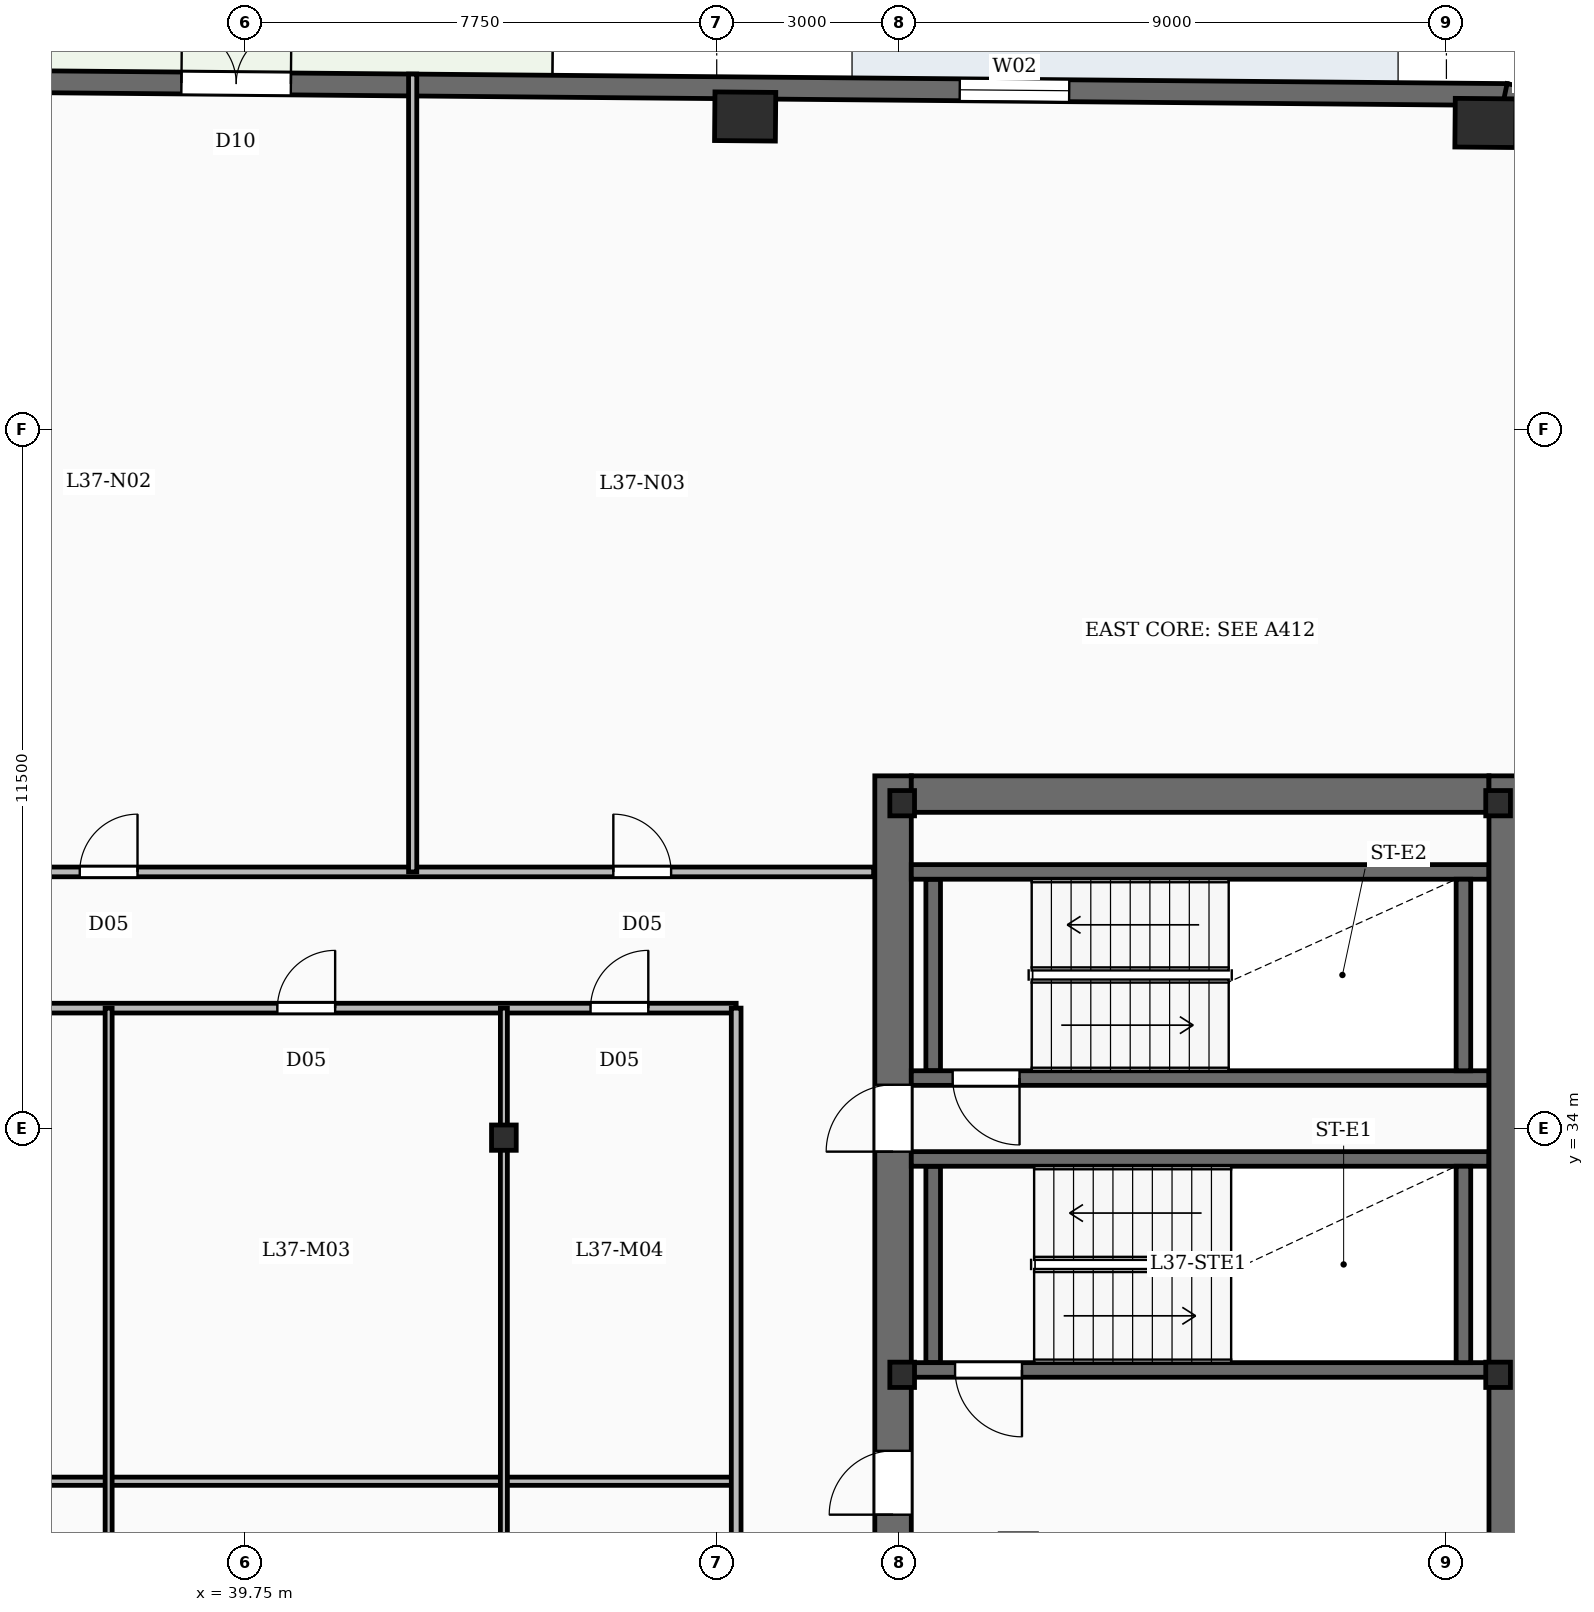
"""IFC4 building model, lengths in metres.
Left out: names, types, materials, properties, quantities, classifications, styles, units other than length and angle.
Written with IfcOpenShell. Run it as: python <this file> out.ifc"""

import sys

from ifc_helpers import new_model, si_unit, direction, frame, frame_2d, origin, origin_2d, place, context, subcontext, project, spatial, rectangle, i_section, extrude, element, fill, save


model = new_model("IFC4")
c1 = context("Model", 3, precision=1e-05, world=origin(), true_north=direction((0.0, 1.0)))
c2 = subcontext(c1, "Body", "Model", "MODEL_VIEW")
j1 = project(units=[si_unit("LENGTHUNIT", "METRE"), si_unit("PLANEANGLEUNIT", "RADIAN")], contexts=[c1])
p1 = place(None, origin())
s1 = spatial("IfcSite", under=j1, at=p1, CompositionType="ELEMENT")
p2 = place(p1, origin())
s2 = spatial("IfcBuilding", under=s1, at=p2, CompositionType="ELEMENT")
p3 = place(p2, frame((0.0, 0.0, 158.45)))
s3 = spatial("IfcBuildingStorey", under=s2, at=p3, CompositionType="ELEMENT", Elevation=158.45)
p4 = place(p3, frame((50.4, 19.0, -0.45), z_axis=(0.0, 0.0, 1.0), x_axis=(0.0, 1.0, 0.0)))
e1 = element("IfcWall", 1, at=p4, inside=s3, PredefinedType="SHEAR", context=c2, shape_type="SweptSolid", body=[
    extrude(rectangle(XDim=20.8, YDim=0.6, at=frame_2d((10.4, 0.0))), origin(), (0.0, 0.0, 1.0), 3.93),
])
p5 = place(p4, frame((2.5, 0.0, 0.45)))
e2 = element("IfcOpeningElement", 2, at=p5, cuts=e1, PredefinedType="OPENING", context=c2, shape_type="SweptSolid", body=[
    extrude(rectangle(XDim=1.05, YDim=2.15, at=frame_2d((0.525, 1.075))), frame((0.0, 0.31, 0.0), z_axis=(0.0, -1.0, 0.0), x_axis=(1.0, 0.0, 0.0)), (0.0, 0.0, 1.0), 0.62),
])
p6 = place(p4, frame((8.65, 0.0, 0.45)))
e3 = element("IfcOpeningElement", 3, at=p6, cuts=e1, PredefinedType="OPENING", context=c2, shape_type="SweptSolid", body=[
    extrude(rectangle(XDim=1.05, YDim=2.15, at=frame_2d((0.525, 1.075))), frame((0.0, 0.31, 0.0), z_axis=(0.0, -1.0, 0.0), x_axis=(1.0, 0.0, 0.0)), (0.0, 0.0, 1.0), 0.62),
])
p7 = place(p4, frame((14.62, 0.0, 0.45)))
e4 = element("IfcOpeningElement", 4, at=p7, cuts=e1, PredefinedType="OPENING", context=c2, shape_type="SweptSolid", body=[
    extrude(rectangle(XDim=1.1, YDim=2.15, at=frame_2d((0.55, 1.075))), frame((0.0, 0.31, 0.0), z_axis=(0.0, -1.0, 0.0), x_axis=(1.0, 0.0, 0.0)), (0.0, 0.0, 1.0), 0.62),
])
p8 = place(p3, frame((60.5, 19.0, -0.45), z_axis=(0.0, 0.0, 1.0), x_axis=(0.0, 1.0, 0.0)))
e5 = element("IfcWall", 5, at=p8, inside=s3, PredefinedType="SHEAR", context=c2, shape_type="SweptSolid", body=[
    extrude(rectangle(XDim=20.8, YDim=0.6, at=frame_2d((10.4, 0.0))), origin(), (0.0, 0.0, 1.0), 3.93),
])
p9 = place(p3, frame((50.7, 39.5, -0.45), z_axis=(0.0, 0.0, 1.0), x_axis=(1.0, 0.0, 0.0)))
e6 = element("IfcWall", 6, at=p9, inside=s3, PredefinedType="SHEAR", context=c2, shape_type="SweptSolid", body=[
    extrude(rectangle(XDim=9.5, YDim=0.6, at=frame_2d((4.75, 0.0))), origin(), (0.0, 0.0, 1.0), 3.93),
])
for number, where, z_axis, x_axis in (
    (7, (50.55, 29.95, -0.45), (0.0, 0.0, 1.0), (1.0, 0.0, 0.0)),
    (8, (60.35, 29.95, -0.45), (0.0, 0.0, 1.0), (1.0, 0.0, 0.0)),
    (9, (50.55, 39.35, -0.45), (0.0, 0.0, 1.0), (1.0, 0.0, 0.0)),
    (10, (60.35, 39.35, -0.45), (0.0, 0.0, 1.0), (1.0, 0.0, 0.0)),
    (11, (44.0, 33.85, -0.45), (0.0, 0.0, 1.0), (1.0, 0.0, 0.0)),
):
    element("IfcColumn", number, at=place(p3, frame(where, z_axis=z_axis, x_axis=x_axis)), inside=s3, PredefinedType="COLUMN", context=c2, shape_type="SweptSolid", body=[
        extrude(i_section(OverallWidth=0.406, OverallDepth=0.416, WebThickness=0.03, FlangeThickness=0.048, FilletRadius=0.02, at=origin_2d()), origin(), (0.0, 0.0, 1.0), 3.93),
    ])
for number, where, z_axis, x_axis in (
    (12, (60.142, 50.537, -0.45), (0.0, 0.0, 1.0), (1.0, -0.009, 0.0)),
    (13, (47.968, 50.643, -0.45), (0.0, 0.0, 1.0), (1.0, -0.009, 0.0)),
):
    element("IfcColumn", number, at=place(p3, frame(where, z_axis=z_axis, x_axis=x_axis)), inside=s3, PredefinedType="COLUMN", context=c2, shape_type="SweptSolid", body=[
        extrude(rectangle(XDim=1.0, YDim=0.8, at=origin_2d()), origin(), (0.0, 0.0, 1.0), 3.93),
    ])
p10 = place(p3, frame((60.461, 51.007, 0.0), z_axis=(0.0, 0.0, 1.0), x_axis=(0.979059388908, -0.203574833883, 0.0)))
e14 = element("IfcWall", 14, at=p10, inside=s3, PredefinedType="SOLIDWALL", context=c2, shape_type="SweptSolid", body=[
    extrude(rectangle(XDim=2.107, YDim=0.36, at=frame_2d((1.054, 0.0))), origin(), (0.0, 0.0, 1.0), 3.48),
])
p11 = place(p3, frame((11.098, 51.435, 0.0), z_axis=(0.0, 0.0, 1.0), x_axis=(0.99996191194, -0.008727810138, 0.0)))
e15 = element("IfcWall", 15, at=p11, inside=s3, PredefinedType="SOLIDWALL", context=c2, shape_type="SweptSolid", body=[
    extrude(rectangle(XDim=49.4, YDim=0.36, at=frame_2d((24.7, 0.0))), origin(), (0.0, 0.0, 1.0), 3.48),
])
p12 = place(p11, frame((27.6, 0.0, 0.0)))
e16 = element("IfcOpeningElement", 16, at=p12, cuts=e15, PredefinedType="OPENING", context=c2, shape_type="SweptSolid", body=[
    extrude(rectangle(XDim=1.8, YDim=2.25, at=frame_2d((0.9, 1.125))), frame((0.0, 0.19, 0.0), z_axis=(0.0, -1.0, 0.0), x_axis=(1.0, 0.0, 0.0)), (0.0, 0.0, 1.0), 0.38),
])
p13 = place(p11, frame((8.0, 0.0, 0.88)))
e17 = element("IfcOpeningElement", 17, at=p13, cuts=e15, PredefinedType="OPENING", context=c2, shape_type="SweptSolid", body=[
    extrude(rectangle(XDim=1.8, YDim=2.15, at=frame_2d((0.9, 1.075))), frame((0.0, 0.19, 0.0), z_axis=(0.0, -1.0, 0.0), x_axis=(1.0, 0.0, 0.0)), (0.0, 0.0, 1.0), 0.38),
])
p14 = place(p11, frame((18.8, 0.0, 0.88)))
e18 = element("IfcOpeningElement", 18, at=p14, cuts=e15, PredefinedType="OPENING", context=c2, shape_type="SweptSolid", body=[
    extrude(rectangle(XDim=1.8, YDim=2.15, at=frame_2d((0.9, 1.075))), frame((0.0, 0.19, 0.0), z_axis=(0.0, -1.0, 0.0), x_axis=(1.0, 0.0, 0.0)), (0.0, 0.0, 1.0), 0.38),
])
p15 = place(p11, frame((40.4, 0.0, 0.88)))
e19 = element("IfcOpeningElement", 19, at=p15, cuts=e15, PredefinedType="OPENING", context=c2, shape_type="SweptSolid", body=[
    extrude(rectangle(XDim=1.8, YDim=2.15, at=frame_2d((0.9, 1.075))), frame((0.0, 0.19, 0.0), z_axis=(0.0, -1.0, 0.0), x_axis=(1.0, 0.0, 0.0)), (0.0, 0.0, 1.0), 0.38),
])
p16 = place(p3, frame((60.2, 30.03, 0.0), z_axis=(0.0, 0.0, 1.0), x_axis=(-1.0, 0.0, 0.0)))
e20 = element("IfcWall", 20, at=p16, inside=s3, PredefinedType="SOLIDWALL", context=c2, shape_type="SweptSolid", body=[
    extrude(rectangle(XDim=9.5, YDim=0.24, at=frame_2d((4.75, 0.0))), origin(), (0.0, 0.0, 1.0), 3.48),
])
p17 = place(p16, frame((7.68, 0.0, 0.0)))
e21 = element("IfcOpeningElement", 21, at=p17, cuts=e20, PredefinedType="OPENING", context=c2, shape_type="SweptSolid", body=[
    extrude(rectangle(XDim=1.1, YDim=2.15, at=frame_2d((0.55, 1.075))), frame((0.0, 0.13, 0.0), z_axis=(0.0, -1.0, 0.0), x_axis=(1.0, 0.0, 0.0)), (0.0, 0.0, 1.0), 0.26),
])
p18 = place(p3, frame((50.7, 33.5, 0.0), z_axis=(0.0, 0.0, 1.0), x_axis=(1.0, 0.0, 0.0)))
e22 = element("IfcWall", 22, at=p18, inside=s3, PredefinedType="SOLIDWALL", context=c2, shape_type="SweptSolid", body=[
    extrude(rectangle(XDim=9.5, YDim=0.24, at=frame_2d((4.75, 0.0))), origin(), (0.0, 0.0, 1.0), 3.48),
])
for number, where, z_axis, x_axis in (
    (23, (51.06, 30.15, 0.0), (0.0, 0.0, 1.0), (0.0, 1.0, 0.0)),
    (24, (59.78, 30.15, 0.0), (0.0, 0.0, 1.0), (0.0, 1.0, 0.0)),
):
    element("IfcWall", number, at=place(p3, frame(where, z_axis=z_axis, x_axis=x_axis)), inside=s3, PredefinedType="SOLIDWALL", context=c2, shape_type="SweptSolid", body=[
        extrude(rectangle(XDim=3.23, YDim=0.24, at=frame_2d((1.615, 0.0))), origin(), (0.0, 0.0, 1.0), 3.48),
    ])
p19 = place(p3, frame((60.2, 34.83, 0.0), z_axis=(0.0, 0.0, 1.0), x_axis=(-1.0, 0.0, 0.0)))
e25 = element("IfcWall", 25, at=p19, inside=s3, PredefinedType="SOLIDWALL", context=c2, shape_type="SweptSolid", body=[
    extrude(rectangle(XDim=9.5, YDim=0.24, at=frame_2d((4.75, 0.0))), origin(), (0.0, 0.0, 1.0), 3.48),
])
p20 = place(p19, frame((7.72, 0.0, 0.0)))
e26 = element("IfcOpeningElement", 26, at=p20, cuts=e25, PredefinedType="OPENING", context=c2, shape_type="SweptSolid", body=[
    extrude(rectangle(XDim=1.1, YDim=2.15, at=frame_2d((0.55, 1.075))), frame((0.0, 0.13, 0.0), z_axis=(0.0, -1.0, 0.0), x_axis=(1.0, 0.0, 0.0)), (0.0, 0.0, 1.0), 0.26),
])
p21 = place(p3, frame((50.7, 38.22, 0.0), z_axis=(0.0, 0.0, 1.0), x_axis=(1.0, 0.0, 0.0)))
e27 = element("IfcWall", 27, at=p21, inside=s3, PredefinedType="SOLIDWALL", context=c2, shape_type="SweptSolid", body=[
    extrude(rectangle(XDim=9.5, YDim=0.24, at=frame_2d((4.75, 0.0))), origin(), (0.0, 0.0, 1.0), 3.48),
])
for number, where, z_axis, x_axis in (
    (28, (51.06, 34.95, 0.0), (0.0, 0.0, 1.0), (0.0, 1.0, 0.0)),
    (29, (59.78, 34.95, 0.0), (0.0, 0.0, 1.0), (0.0, 1.0, 0.0)),
):
    element("IfcWall", number, at=place(p3, frame(where, z_axis=z_axis, x_axis=x_axis)), inside=s3, PredefinedType="SOLIDWALL", context=c2, shape_type="SweptSolid", body=[
        extrude(rectangle(XDim=3.15, YDim=0.24, at=frame_2d((1.575, 0.0))), origin(), (0.0, 0.0, 1.0), 3.48),
    ])
p22 = place(p3, frame((42.5, 38.22, 0.0), z_axis=(0.0, 0.0, 1.0), x_axis=(0.0, 1.0, 0.0)))
e30 = element("IfcWall", 30, at=p22, inside=s3, PredefinedType="PARTITIONING", context=c2, shape_type="SweptSolid", body=[
    extrude(rectangle(XDim=13.121, YDim=0.135, at=frame_2d((6.561, 0.0))), origin(), (0.0, 0.0, 1.0), 2.54),
])
p23 = place(p3, frame((24.82, 38.22, 0.0), z_axis=(0.0, 0.0, 1.0), x_axis=(1.0, 0.0, 0.0)))
e31 = element("IfcWall", 31, at=p23, inside=s3, PredefinedType="PARTITIONING", context=c2, shape_type="SweptSolid", body=[
    extrude(rectangle(XDim=25.26, YDim=0.16, at=frame_2d((12.63, 0.0))), origin(), (0.0, 0.0, 1.0), 2.54),
])
p24 = place(p23, frame((3.38, 0.0, 0.0)))
e32 = element("IfcOpeningElement", 32, at=p24, cuts=e31, PredefinedType="OPENING", context=c2, shape_type="SweptSolid", body=[
    extrude(rectangle(XDim=0.95, YDim=2.15, at=frame_2d((0.475, 1.075))), frame((0.0, 0.09, 0.0), z_axis=(0.0, -1.0, 0.0), x_axis=(1.0, 0.0, 0.0)), (0.0, 0.0, 1.0), 0.18),
])
p25 = place(p23, frame((12.205, 0.0, 0.0)))
e33 = element("IfcOpeningElement", 33, at=p25, cuts=e31, PredefinedType="OPENING", context=c2, shape_type="SweptSolid", body=[
    extrude(rectangle(XDim=0.95, YDim=2.15, at=frame_2d((0.475, 1.075))), frame((0.0, 0.09, 0.0), z_axis=(0.0, -1.0, 0.0), x_axis=(1.0, 0.0, 0.0)), (0.0, 0.0, 1.0), 0.18),
])
p26 = place(p23, frame((20.98, 0.0, 0.0)))
e34 = element("IfcOpeningElement", 34, at=p26, cuts=e31, PredefinedType="OPENING", context=c2, shape_type="SweptSolid", body=[
    extrude(rectangle(XDim=0.95, YDim=2.15, at=frame_2d((0.475, 1.075))), frame((0.0, 0.09, 0.0), z_axis=(0.0, -1.0, 0.0), x_axis=(1.0, 0.0, 0.0)), (0.0, 0.0, 1.0), 0.18),
])
for number, where, z_axis, x_axis in (
    (35, (37.5, 15.38, 0.0), (0.0, 0.0, 1.0), (0.0, 1.0, 0.0)),
    (36, (44.0, 15.38, 0.0), (0.0, 0.0, 1.0), (0.0, 1.0, 0.0)),
):
    element("IfcWall", number, at=place(p3, frame(where, z_axis=z_axis, x_axis=x_axis)), inside=s3, PredefinedType="PARTITIONING", context=c2, shape_type="SweptSolid", body=[
        extrude(rectangle(XDim=20.6, YDim=0.115, at=frame_2d((10.3, 0.0))), origin(), (0.0, 0.0, 1.0), 2.54),
    ])
p27 = place(p3, frame((27.08, 28.2, 0.0), z_axis=(0.0, 0.0, 1.0), x_axis=(1.0, 0.0, 0.0)))
e37 = element("IfcWall", 37, at=p27, inside=s3, PredefinedType="PARTITIONING", context=c2, shape_type="SweptSolid", body=[
    extrude(rectangle(XDim=20.74, YDim=0.135, at=frame_2d((10.37, 0.0))), origin(), (0.0, 0.0, 1.0), 2.54),
])
p28 = place(p3, frame((27.08, 35.98, 0.0), z_axis=(0.0, 0.0, 1.0), x_axis=(1.0, 0.0, 0.0)))
e38 = element("IfcWall", 38, at=p28, inside=s3, PredefinedType="PARTITIONING", context=c2, shape_type="SweptSolid", body=[
    extrude(rectangle(XDim=20.74, YDim=0.16, at=frame_2d((10.37, 0.0))), origin(), (0.0, 0.0, 1.0), 2.54),
])
p29 = place(p28, frame((1.245, 0.0, 0.0)))
e39 = element("IfcOpeningElement", 39, at=p29, cuts=e38, PredefinedType="OPENING", context=c2, shape_type="SweptSolid", body=[
    extrude(rectangle(XDim=0.95, YDim=2.15, at=frame_2d((0.475, 1.075))), frame((0.0, 0.09, 0.0), z_axis=(0.0, -1.0, 0.0), x_axis=(1.0, 0.0, 0.0)), (0.0, 0.0, 1.0), 0.18),
])
p30 = place(p28, frame((6.445, 0.0, 0.0)))
e40 = element("IfcOpeningElement", 40, at=p30, cuts=e38, PredefinedType="OPENING", context=c2, shape_type="SweptSolid", body=[
    extrude(rectangle(XDim=0.95, YDim=2.15, at=frame_2d((0.475, 1.075))), frame((0.0, 0.09, 0.0), z_axis=(0.0, -1.0, 0.0), x_axis=(1.0, 0.0, 0.0)), (0.0, 0.0, 1.0), 0.18),
])
p31 = place(p28, frame((13.195, 0.0, 0.0)))
e41 = element("IfcOpeningElement", 41, at=p31, cuts=e38, PredefinedType="OPENING", context=c2, shape_type="SweptSolid", body=[
    extrude(rectangle(XDim=0.95, YDim=2.15, at=frame_2d((0.475, 1.075))), frame((0.0, 0.09, 0.0), z_axis=(0.0, -1.0, 0.0), x_axis=(1.0, 0.0, 0.0)), (0.0, 0.0, 1.0), 0.18),
])
p32 = place(p28, frame((18.345, 0.0, 0.0)))
e42 = element("IfcOpeningElement", 42, at=p32, cuts=e38, PredefinedType="OPENING", context=c2, shape_type="SweptSolid", body=[
    extrude(rectangle(XDim=0.95, YDim=2.15, at=frame_2d((0.475, 1.075))), frame((0.0, 0.09, 0.0), z_axis=(0.0, -1.0, 0.0), x_axis=(1.0, 0.0, 0.0)), (0.0, 0.0, 1.0), 0.18),
])
p33 = place(p3, frame((47.82, 15.38, 0.0), z_axis=(0.0, 0.0, 1.0), x_axis=(0.0, 1.0, 0.0)))
e43 = element("IfcWall", 43, at=p33, inside=s3, PredefinedType="PARTITIONING", context=c2, shape_type="SweptSolid", body=[
    extrude(rectangle(XDim=20.6, YDim=0.16, at=frame_2d((10.3, 0.0))), origin(), (0.0, 0.0, 1.0), 2.54),
])
p34 = place(p12, origin())
e44 = element("IfcDoor", 44, at=p34, inside=s3, OperationType="DOUBLE_DOOR_SINGLE_SWING", PredefinedType="DOOR", context=c2, shape_type="SweptSolid", body=[
    extrude(rectangle(XDim=1.8, YDim=2.25, at=frame_2d((0.9, 1.125))), frame((0.0, 0.025, 0.0), z_axis=(0.0, -1.0, 0.0), x_axis=(1.0, 0.0, 0.0)), (0.0, 0.0, 1.0), 0.05),
])
fill(e16, e44)
p35 = place(p15, origin())
e45 = element("IfcWindow", 45, at=p35, inside=s3, PartitioningType="DOUBLE_PANEL_VERTICAL", PredefinedType="WINDOW", context=c2, shape_type="SweptSolid", body=[
    extrude(rectangle(XDim=1.8, YDim=2.15, at=frame_2d((0.9, 1.075))), frame((0.0, 0.03, 0.0), z_axis=(0.0, -1.0, 0.0), x_axis=(1.0, 0.0, 0.0)), (0.0, 0.0, 1.0), 0.06),
])
fill(e19, e45)
p36 = place(p6, origin())
e46 = element("IfcDoor", 46, at=p36, inside=s3, OperationType="SINGLE_SWING_LEFT", PredefinedType="DOOR", context=c2, shape_type="SweptSolid", body=[
    extrude(rectangle(XDim=1.05, YDim=2.15, at=frame_2d((0.525, 1.075))), frame((0.0, 0.025, 0.0), z_axis=(0.0, -1.0, 0.0), x_axis=(1.0, 0.0, 0.0)), (0.0, 0.0, 1.0), 0.05),
])
fill(e3, e46)
p37 = place(p7, origin())
e47 = element("IfcDoor", 47, at=p37, inside=s3, OperationType="SINGLE_SWING_LEFT", PredefinedType="DOOR", context=c2, shape_type="SweptSolid", body=[
    extrude(rectangle(XDim=1.1, YDim=2.15, at=frame_2d((0.55, 1.075))), frame((0.0, 0.025, 0.0), z_axis=(0.0, -1.0, 0.0), x_axis=(1.0, 0.0, 0.0)), (0.0, 0.0, 1.0), 0.05),
])
fill(e4, e47)
p38 = place(p17, origin())
e48 = element("IfcDoor", 48, at=p38, inside=s3, OperationType="SINGLE_SWING_LEFT", PredefinedType="DOOR", context=c2, shape_type="SweptSolid", body=[
    extrude(rectangle(XDim=1.1, YDim=2.15, at=frame_2d((0.55, 1.075))), frame((0.0, 0.025, 0.0), z_axis=(0.0, -1.0, 0.0), x_axis=(1.0, 0.0, 0.0)), (0.0, 0.0, 1.0), 0.05),
])
fill(e21, e48)
p39 = place(p20, origin())
e49 = element("IfcDoor", 49, at=p39, inside=s3, OperationType="SINGLE_SWING_LEFT", PredefinedType="DOOR", context=c2, shape_type="SweptSolid", body=[
    extrude(rectangle(XDim=1.1, YDim=2.15, at=frame_2d((0.55, 1.075))), frame((0.0, 0.025, 0.0), z_axis=(0.0, -1.0, 0.0), x_axis=(1.0, 0.0, 0.0)), (0.0, 0.0, 1.0), 0.05),
])
fill(e26, e49)
p40 = place(p25, origin())
e50 = element("IfcDoor", 50, at=p40, inside=s3, OperationType="SINGLE_SWING_RIGHT", PredefinedType="DOOR", context=c2, shape_type="SweptSolid", body=[
    extrude(rectangle(XDim=0.95, YDim=2.15, at=frame_2d((0.475, 1.075))), frame((0.0, 0.025, 0.0), z_axis=(0.0, -1.0, 0.0), x_axis=(1.0, 0.0, 0.0)), (0.0, 0.0, 1.0), 0.05),
])
fill(e33, e50)
p41 = place(p26, origin())
e51 = element("IfcDoor", 51, at=p41, inside=s3, OperationType="SINGLE_SWING_LEFT", PredefinedType="DOOR", context=c2, shape_type="SweptSolid", body=[
    extrude(rectangle(XDim=0.95, YDim=2.15, at=frame_2d((0.475, 1.075))), frame((0.0, 0.025, 0.0), z_axis=(0.0, -1.0, 0.0), x_axis=(1.0, 0.0, 0.0)), (0.0, 0.0, 1.0), 0.05),
])
fill(e34, e51)
p42 = place(p31, origin())
e52 = element("IfcDoor", 52, at=p42, inside=s3, OperationType="SINGLE_SWING_RIGHT", PredefinedType="DOOR", context=c2, shape_type="SweptSolid", body=[
    extrude(rectangle(XDim=0.95, YDim=2.15, at=frame_2d((0.475, 1.075))), frame((0.0, 0.025, 0.0), z_axis=(0.0, -1.0, 0.0), x_axis=(1.0, 0.0, 0.0)), (0.0, 0.0, 1.0), 0.05),
])
fill(e41, e52)
p43 = place(p32, origin())
e53 = element("IfcDoor", 53, at=p43, inside=s3, OperationType="SINGLE_SWING_RIGHT", PredefinedType="DOOR", context=c2, shape_type="SweptSolid", body=[
    extrude(rectangle(XDim=0.95, YDim=2.15, at=frame_2d((0.475, 1.075))), frame((0.0, 0.025, 0.0), z_axis=(0.0, -1.0, 0.0), x_axis=(1.0, 0.0, 0.0)), (0.0, 0.0, 1.0), 0.05),
])
fill(e42, e53)
save(model, sys.argv[1])
